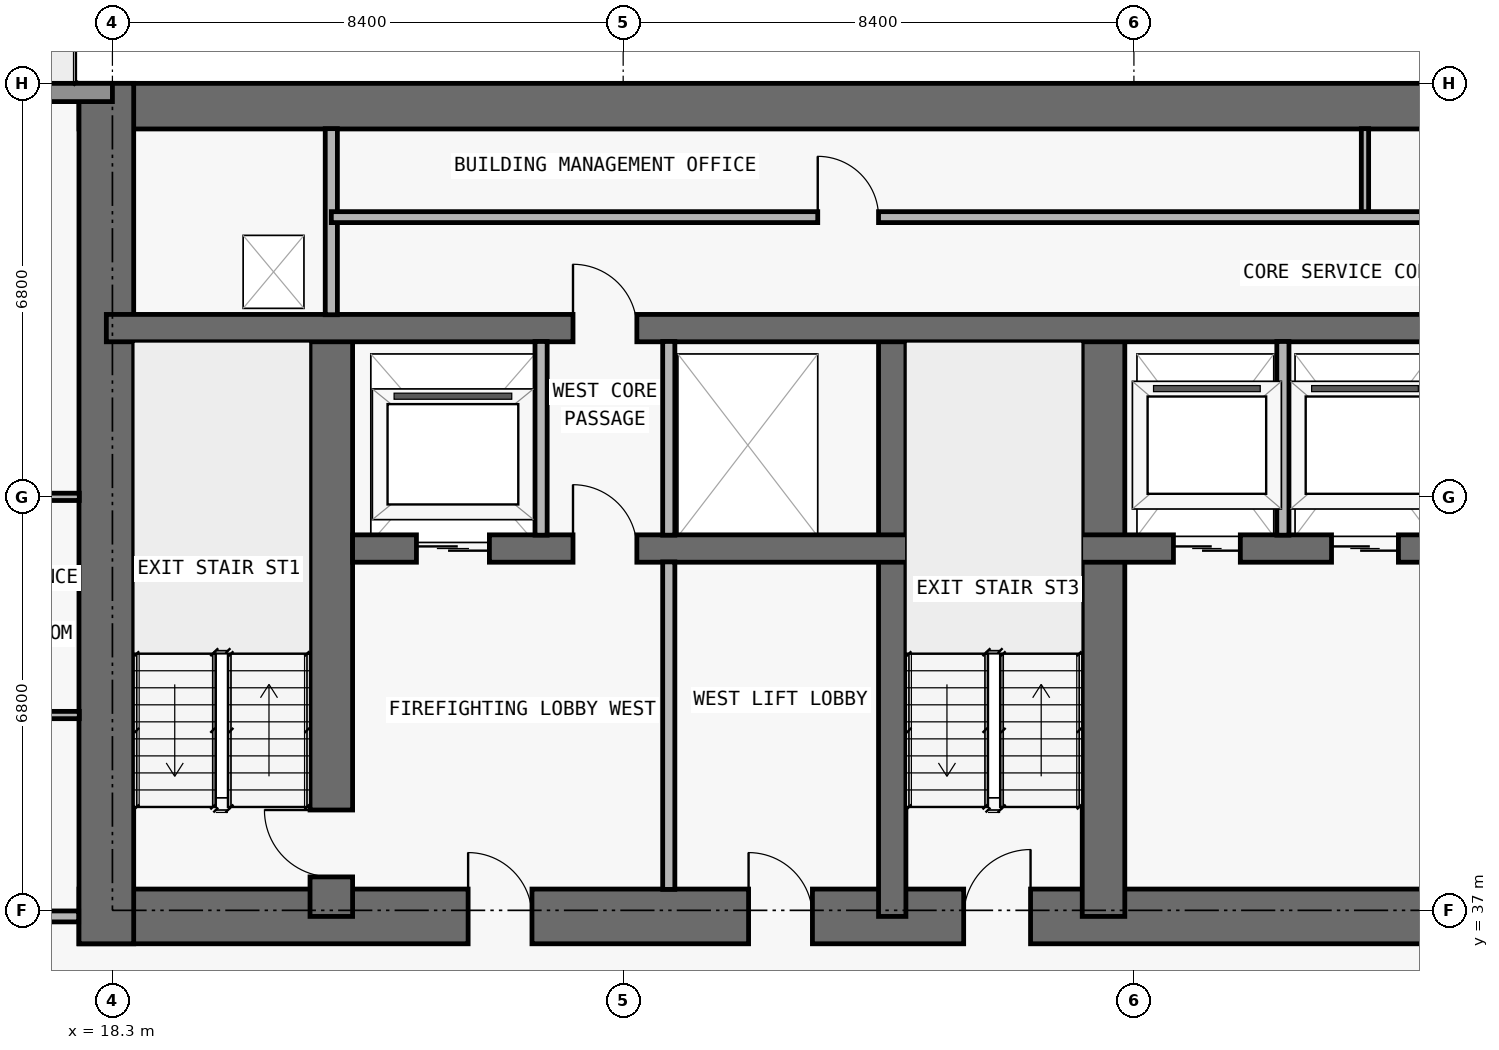
"""IFC4 building model, lengths in metres.
Left out: names, types, materials, properties, quantities, classifications, styles, units other than length and angle.
Written with IfcOpenShell. Run it as: python <this file> out.ifc"""

import sys

from ifc_helpers import new_model, si_unit, direction, frame, frame_2d, origin, place, context, subcontext, project, spatial, rectangle, extrude, element, fill, save


model = new_model("IFC4")
c1 = context("Model", 3, precision=1e-05, world=origin(), true_north=direction((0.0, 1.0)))
c2 = subcontext(c1, "Body", "Model", "MODEL_VIEW")
j1 = project(units=[si_unit("LENGTHUNIT", "METRE"), si_unit("PLANEANGLEUNIT", "RADIAN")], contexts=[c1])
p1 = place(None, origin())
s1 = spatial("IfcSite", under=j1, at=p1, CompositionType="ELEMENT")
p2 = place(p1, origin())
s2 = spatial("IfcBuilding", under=s1, at=p2, CompositionType="ELEMENT")
p3 = place(p2, frame((0.0, 0.0, 30.0)))
s3 = spatial("IfcBuildingStorey", under=s2, at=p3, CompositionType="ELEMENT", Elevation=30.0)
p4 = place(p3, frame((17.75, 36.9, 0.0), z_axis=(0.0, 0.0, 1.0), x_axis=(1.0, 0.0, 0.0)))
e1 = element("IfcWall", 1, at=p4, inside=s3, PredefinedType="SHEAR", context=c2, shape_type="SweptSolid", body=[
    extrude(rectangle(XDim=42.3, YDim=0.9, at=frame_2d((21.15, 0.0))), origin(), (0.0, 0.0, 1.0), 3.05),
])
p5 = place(p4, frame((14.55, 0.0, 0.0)))
e2 = element("IfcOpeningElement", 2, at=p5, cuts=e1, PredefinedType="OPENING", context=c2, shape_type="SweptSolid", body=[
    extrude(rectangle(XDim=1.1, YDim=2.15, at=frame_2d((0.55, 1.075))), frame((0.0, 0.46, 0.0), z_axis=(0.0, -1.0, 0.0), x_axis=(1.0, 0.0, 0.0)), (0.0, 0.0, 1.0), 0.92),
])
p6 = place(p4, frame((6.4, 0.0, 0.0)))
e3 = element("IfcOpeningElement", 3, at=p6, cuts=e1, PredefinedType="OPENING", context=c2, shape_type="SweptSolid", body=[
    extrude(rectangle(XDim=1.05, YDim=2.15, at=frame_2d((0.525, 1.075))), frame((0.0, 0.46, 0.0), z_axis=(0.0, -1.0, 0.0), x_axis=(1.0, 0.0, 0.0)), (0.0, 0.0, 1.0), 0.92),
])
p7 = place(p4, frame((34.9, 0.0, 0.0)))
e4 = element("IfcOpeningElement", 4, at=p7, cuts=e1, PredefinedType="OPENING", context=c2, shape_type="SweptSolid", body=[
    extrude(rectangle(XDim=1.05, YDim=2.15, at=frame_2d((0.525, 1.075))), frame((0.0, 0.46, 0.0), z_axis=(0.0, -1.0, 0.0), x_axis=(1.0, 0.0, 0.0)), (0.0, 0.0, 1.0), 0.92),
])
p8 = place(p4, frame((11.012, 0.0, 0.0)))
e5 = element("IfcOpeningElement", 5, at=p8, cuts=e1, PredefinedType="OPENING", context=c2, shape_type="SweptSolid", body=[
    extrude(rectangle(XDim=1.05, YDim=2.15, at=frame_2d((0.525, 1.075))), frame((0.0, 0.46, 0.0), z_axis=(0.0, -1.0, 0.0), x_axis=(1.0, 0.0, 0.0)), (0.0, 0.0, 1.0), 0.92),
])
p9 = place(p4, frame((24.25, 0.0, 0.0)))
e6 = element("IfcOpeningElement", 6, at=p9, cuts=e1, PredefinedType="OPENING", context=c2, shape_type="SweptSolid", body=[
    extrude(rectangle(XDim=1.05, YDim=2.15, at=frame_2d((0.525, 1.075))), frame((0.0, 0.46, 0.0), z_axis=(0.0, -1.0, 0.0), x_axis=(1.0, 0.0, 0.0)), (0.0, 0.0, 1.0), 0.92),
])
p10 = place(p3, frame((17.75, 50.225, 0.0), z_axis=(0.0, 0.0, 1.0), x_axis=(1.0, 0.0, 0.0)))
e7 = element("IfcWall", 7, at=p10, inside=s3, PredefinedType="SHEAR", context=c2, shape_type="SweptSolid", body=[
    extrude(rectangle(XDim=42.3, YDim=0.75, at=frame_2d((21.15, 0.0))), origin(), (0.0, 0.0, 1.0), 3.05),
])
p11 = place(p3, frame((18.2, 36.45, 0.0), z_axis=(0.0, 0.0, 1.0), x_axis=(0.0, 1.0, 0.0)))
e8 = element("IfcWall", 8, at=p11, inside=s3, PredefinedType="SHEAR", context=c2, shape_type="SweptSolid", body=[
    extrude(rectangle(XDim=14.15, YDim=0.9, at=frame_2d((7.075, 0.0))), origin(), (0.0, 0.0, 1.0), 3.05),
])
p12 = place(p3, frame((21.9, 36.9, 0.0), z_axis=(0.0, 0.0, 1.0), x_axis=(0.0, 1.0, 0.0)))
e9 = element("IfcWall", 9, at=p12, inside=s3, PredefinedType="SHEAR", context=c2, shape_type="SweptSolid", body=[
    extrude(rectangle(XDim=9.675, YDim=0.7, at=frame_2d((4.837, 0.0))), origin(), (0.0, 0.0, 1.0), 3.05),
])
p13 = place(p12, frame((0.65, 0.0, 0.0)))
e10 = element("IfcOpeningElement", 10, at=p13, cuts=e9, PredefinedType="OPENING", context=c2, shape_type="SweptSolid", body=[
    extrude(rectangle(XDim=1.1, YDim=2.15, at=frame_2d((0.55, 1.075))), frame((0.0, 0.36, 0.0), z_axis=(0.0, -1.0, 0.0), x_axis=(1.0, 0.0, 0.0)), (0.0, 0.0, 1.0), 0.72),
])
p14 = place(p3, frame((31.125, 36.9, 0.0), z_axis=(0.0, 0.0, 1.0), x_axis=(0.0, 1.0, 0.0)))
e11 = element("IfcWall", 11, at=p14, inside=s3, PredefinedType="SHEAR", context=c2, shape_type="SweptSolid", body=[
    extrude(rectangle(XDim=9.675, YDim=0.45, at=frame_2d((4.837, 0.0))), origin(), (0.0, 0.0, 1.0), 3.05),
])
p15 = place(p3, frame((34.6, 36.9, 0.0), z_axis=(0.0, 0.0, 1.0), x_axis=(0.0, 1.0, 0.0)))
e12 = element("IfcWall", 12, at=p15, inside=s3, PredefinedType="SHEAR", context=c2, shape_type="SweptSolid", body=[
    extrude(rectangle(XDim=9.675, YDim=0.7, at=frame_2d((4.837, 0.0))), origin(), (0.0, 0.0, 1.0), 3.05),
])
p16 = place(p3, frame((22.25, 42.95, 0.0), z_axis=(0.0, 0.0, 1.0), x_axis=(1.0, 0.0, 0.0)))
e13 = element("IfcWall", 13, at=p16, inside=s3, PredefinedType="SHEAR", context=c2, shape_type="SweptSolid", body=[
    extrude(rectangle(XDim=33.3, YDim=0.45, at=frame_2d((16.65, 0.0))), origin(), (0.0, 0.0, 1.0), 3.05),
])
p17 = place(p16, frame((1.05, 0.0, 0.0)))
e14 = element("IfcOpeningElement", 14, at=p17, cuts=e13, PredefinedType="OPENING", context=c2, shape_type="SweptSolid", body=[
    extrude(rectangle(XDim=1.2, YDim=2.2, at=frame_2d((0.6, 1.1))), frame((0.0, 0.235, 0.0), z_axis=(0.0, -1.0, 0.0), x_axis=(1.0, 0.0, 0.0)), (0.0, 0.0, 1.0), 0.47),
])
p18 = place(p16, frame((31.05, 0.0, 0.0)))
e15 = element("IfcOpeningElement", 15, at=p18, cuts=e13, PredefinedType="OPENING", context=c2, shape_type="SweptSolid", body=[
    extrude(rectangle(XDim=1.2, YDim=2.2, at=frame_2d((0.6, 1.1))), frame((0.0, 0.235, 0.0), z_axis=(0.0, -1.0, 0.0), x_axis=(1.0, 0.0, 0.0)), (0.0, 0.0, 1.0), 0.47),
])
p19 = place(p16, frame((13.5, 0.0, 0.0)))
e16 = element("IfcOpeningElement", 16, at=p19, cuts=e13, PredefinedType="OPENING", context=c2, shape_type="SweptSolid", body=[
    extrude(rectangle(XDim=1.1, YDim=2.2, at=frame_2d((0.55, 1.1))), frame((0.0, 0.235, 0.0), z_axis=(0.0, -1.0, 0.0), x_axis=(1.0, 0.0, 0.0)), (0.0, 0.0, 1.0), 0.47),
])
p20 = place(p16, frame((16.1, 0.0, 0.0)))
e17 = element("IfcOpeningElement", 17, at=p20, cuts=e13, PredefinedType="OPENING", context=c2, shape_type="SweptSolid", body=[
    extrude(rectangle(XDim=1.1, YDim=2.2, at=frame_2d((0.55, 1.1))), frame((0.0, 0.235, 0.0), z_axis=(0.0, -1.0, 0.0), x_axis=(1.0, 0.0, 0.0)), (0.0, 0.0, 1.0), 0.47),
])
p21 = place(p16, frame((18.7, 0.0, 0.0)))
e18 = element("IfcOpeningElement", 18, at=p21, cuts=e13, PredefinedType="OPENING", context=c2, shape_type="SweptSolid", body=[
    extrude(rectangle(XDim=1.1, YDim=2.2, at=frame_2d((0.55, 1.1))), frame((0.0, 0.235, 0.0), z_axis=(0.0, -1.0, 0.0), x_axis=(1.0, 0.0, 0.0)), (0.0, 0.0, 1.0), 0.47),
])
p22 = place(p16, frame((3.625, 0.0, 0.0)))
e19 = element("IfcOpeningElement", 19, at=p22, cuts=e13, PredefinedType="OPENING", context=c2, shape_type="SweptSolid", body=[
    extrude(rectangle(XDim=1.05, YDim=2.15, at=frame_2d((0.525, 1.075))), frame((0.0, 0.235, 0.0), z_axis=(0.0, -1.0, 0.0), x_axis=(1.0, 0.0, 0.0)), (0.0, 0.0, 1.0), 0.47),
])
p23 = place(p16, frame((28.675, 0.0, 0.0)))
e20 = element("IfcOpeningElement", 20, at=p23, cuts=e13, PredefinedType="OPENING", context=c2, shape_type="SweptSolid", body=[
    extrude(rectangle(XDim=1.05, YDim=2.15, at=frame_2d((0.525, 1.075))), frame((0.0, 0.235, 0.0), z_axis=(0.0, -1.0, 0.0), x_axis=(1.0, 0.0, 0.0)), (0.0, 0.0, 1.0), 0.47),
])
p24 = place(p3, frame((18.2, 46.575, 0.0), z_axis=(0.0, 0.0, 1.0), x_axis=(1.0, 0.0, 0.0)))
e21 = element("IfcWall", 21, at=p24, inside=s3, PredefinedType="SHEAR", context=c2, shape_type="SweptSolid", body=[
    extrude(rectangle(XDim=41.4, YDim=0.45, at=frame_2d((20.7, 0.0))), origin(), (0.0, 0.0, 1.0), 3.05),
])
p25 = place(p24, frame((7.675, 0.0, 0.0)))
e22 = element("IfcOpeningElement", 22, at=p25, cuts=e21, PredefinedType="OPENING", context=c2, shape_type="SweptSolid", body=[
    extrude(rectangle(XDim=1.05, YDim=2.15, at=frame_2d((0.525, 1.075))), frame((0.0, 0.235, 0.0), z_axis=(0.0, -1.0, 0.0), x_axis=(1.0, 0.0, 0.0)), (0.0, 0.0, 1.0), 0.47),
])
p26 = place(p24, frame((32.725, 0.0, 0.0)))
e23 = element("IfcOpeningElement", 23, at=p26, cuts=e21, PredefinedType="OPENING", context=c2, shape_type="SweptSolid", body=[
    extrude(rectangle(XDim=1.05, YDim=2.15, at=frame_2d((0.525, 1.075))), frame((0.0, 0.235, 0.0), z_axis=(0.0, -1.0, 0.0), x_axis=(1.0, 0.0, 0.0)), (0.0, 0.0, 1.0), 0.47),
])
p27 = place(p3, frame((5.1, 50.45, 0.0), z_axis=(0.0, 0.0, 1.0), x_axis=(1.0, 0.0, 0.0)))
e24 = element("IfcWall", 24, at=p27, inside=s3, PredefinedType="STANDARD", context=c2, shape_type="SweptSolid", body=[
    extrude(rectangle(XDim=13.2, YDim=0.3, at=frame_2d((6.6, 0.0))), origin(), (0.0, 0.0, 1.0), 3.05),
])
p28 = place(p27, frame((5.6, 0.0, 0.0)))
e25 = element("IfcOpeningElement", 25, at=p28, cuts=e24, PredefinedType="OPENING", context=c2, shape_type="SweptSolid", body=[
    extrude(rectangle(XDim=2.0, YDim=2.3, at=frame_2d((1.0, 1.15))), frame((0.0, 0.16, 0.0), z_axis=(0.0, -1.0, 0.0), x_axis=(1.0, 0.0, 0.0)), (0.0, 0.0, 1.0), 0.32),
])
p29 = place(p3, frame((21.9, 46.795, 0.0), z_axis=(0.0, 0.0, 1.0), x_axis=(0.0, 1.0, 0.0)))
e26 = element("IfcWall", 26, at=p29, inside=s3, PredefinedType="PARTITIONING", context=c2, shape_type="SweptSolid", body=[
    extrude(rectangle(XDim=3.06, YDim=0.2, at=frame_2d((1.53, 0.0))), origin(), (0.0, 0.0, 1.0), 3.05),
])
p30 = place(p3, frame((25.35, 43.17, 0.0), z_axis=(0.0, 0.0, 1.0), x_axis=(0.0, 1.0, 0.0)))
e27 = element("IfcWall", 27, at=p30, inside=s3, PredefinedType="PARTITIONING", context=c2, shape_type="SweptSolid", body=[
    extrude(rectangle(XDim=3.185, YDim=0.2, at=frame_2d((1.593, 0.0))), origin(), (0.0, 0.0, 1.0), 3.05),
])
p31 = place(p3, frame((27.45, 37.345, 0.0), z_axis=(0.0, 0.0, 1.0), x_axis=(0.0, 1.0, 0.0)))
e28 = element("IfcWall", 28, at=p31, inside=s3, PredefinedType="PARTITIONING", context=c2, shape_type="SweptSolid", body=[
    extrude(rectangle(XDim=5.385, YDim=0.2, at=frame_2d((2.692, 0.0))), origin(), (0.0, 0.0, 1.0), 3.05),
])
for number, where, z_axis, x_axis in (
    (29, (27.45, 43.17, 0.0), (0.0, 0.0, 1.0), (0.0, 1.0, 0.0)),
    (30, (37.55, 43.17, 0.0), (0.0, 0.0, 1.0), (0.0, 1.0, 0.0)),
):
    element("IfcWall", number, at=place(p3, frame(where, z_axis=z_axis, x_axis=x_axis)), inside=s3, PredefinedType="PARTITIONING", context=c2, shape_type="SweptSolid", body=[
        extrude(rectangle(XDim=3.185, YDim=0.2, at=frame_2d((1.593, 0.0))), origin(), (0.0, 0.0, 1.0), 3.05),
    ])
p32 = place(p3, frame((38.9, 48.4, 0.0), z_axis=(0.0, 0.0, 1.0), x_axis=(0.0, 1.0, 0.0)))
e31 = element("IfcWall", 31, at=p32, inside=s3, PredefinedType="PARTITIONING", context=c2, shape_type="SweptSolid", body=[
    extrude(rectangle(XDim=1.455, YDim=0.12, at=frame_2d((0.728, 0.0))), origin(), (0.0, 0.0, 1.0), 3.05),
])
p33 = place(p3, frame((5.1, 36.9, 0.0), z_axis=(0.0, 0.0, 1.0), x_axis=(1.0, 0.0, 0.0)))
e32 = element("IfcWall", 32, at=p33, inside=s3, PredefinedType="PARTITIONING", context=c2, shape_type="SweptSolid", body=[
    extrude(rectangle(XDim=12.645, YDim=0.18, at=frame_2d((6.323, 0.0))), origin(), (0.0, 0.0, 1.0), 3.05),
])
p34 = place(p33, frame((7.125, 0.0, 0.0)))
e33 = element("IfcOpeningElement", 33, at=p34, cuts=e32, PredefinedType="OPENING", context=c2, shape_type="SweptSolid", body=[
    extrude(rectangle(XDim=1.0, YDim=2.2, at=frame_2d((0.5, 1.1))), frame((0.0, 0.1, 0.0), z_axis=(0.0, -1.0, 0.0), x_axis=(1.0, 0.0, 0.0)), (0.0, 0.0, 1.0), 0.2),
])
p35 = place(p3, frame((15.55, 40.212, 0.0), z_axis=(0.0, 0.0, 1.0), x_axis=(1.0, 0.0, 0.0)))
e34 = element("IfcWall", 34, at=p35, inside=s3, PredefinedType="PARTITIONING", context=c2, shape_type="SweptSolid", body=[
    extrude(rectangle(XDim=2.205, YDim=0.12, at=frame_2d((1.103, 0.0))), origin(), (0.0, 0.0, 1.0), 3.05),
])
p36 = place(p3, frame((1.795, 43.8, 0.0), z_axis=(0.0, 0.0, 1.0), x_axis=(1.0, 0.0, 0.0)))
e35 = element("IfcWall", 35, at=p36, inside=s3, PredefinedType="PARTITIONING", context=c2, shape_type="SweptSolid", body=[
    extrude(rectangle(XDim=15.96, YDim=0.12, at=frame_2d((7.98, 0.0))), origin(), (0.0, 0.0, 1.0), 2.339),
])
p37 = place(p36, frame((5.255, 0.0, 0.0)))
e36 = element("IfcOpeningElement", 36, at=p37, cuts=e35, PredefinedType="OPENING", context=c2, shape_type="SweptSolid", body=[
    extrude(rectangle(XDim=0.9, YDim=2.15, at=frame_2d((0.45, 1.075))), frame((0.0, 0.07, 0.0), z_axis=(0.0, -1.0, 0.0), x_axis=(1.0, 0.0, 0.0)), (0.0, 0.0, 1.0), 0.14),
])
p38 = place(p36, frame((10.48, 0.0, 0.0)))
e37 = element("IfcOpeningElement", 37, at=p38, cuts=e35, PredefinedType="OPENING", context=c2, shape_type="SweptSolid", body=[
    extrude(rectangle(XDim=0.9, YDim=2.15, at=frame_2d((0.45, 1.075))), frame((0.0, 0.07, 0.0), z_axis=(0.0, -1.0, 0.0), x_axis=(1.0, 0.0, 0.0)), (0.0, 0.0, 1.0), 0.14),
])
p39 = place(p36, frame((14.433, 0.0, 0.0)))
e38 = element("IfcOpeningElement", 38, at=p39, cuts=e35, PredefinedType="OPENING", context=c2, shape_type="SweptSolid", body=[
    extrude(rectangle(XDim=0.85, YDim=2.1, at=frame_2d((0.425, 1.05))), frame((0.0, 0.07, 0.0), z_axis=(0.0, -1.0, 0.0), x_axis=(1.0, 0.0, 0.0)), (0.0, 0.0, 1.0), 0.14),
])
p40 = place(p3, frame((21.9, 48.4, 0.0), z_axis=(0.0, 0.0, 1.0), x_axis=(1.0, 0.0, 0.0)))
e39 = element("IfcWall", 39, at=p40, inside=s3, PredefinedType="PARTITIONING", context=c2, shape_type="SweptSolid", body=[
    extrude(rectangle(XDim=33.986, YDim=0.18, at=frame_2d((16.993, 0.0))), origin(), (0.0, 0.0, 1.0), 3.05),
])
p41 = place(p40, frame((8.0, 0.0, 0.0)))
e40 = element("IfcOpeningElement", 40, at=p41, cuts=e39, PredefinedType="OPENING", context=c2, shape_type="SweptSolid", body=[
    extrude(rectangle(XDim=1.0, YDim=2.2, at=frame_2d((0.5, 1.1))), frame((0.0, 0.1, 0.0), z_axis=(0.0, -1.0, 0.0), x_axis=(1.0, 0.0, 0.0)), (0.0, 0.0, 1.0), 0.2),
])
p42 = place(p40, frame((24.993, 0.0, 0.0)))
e41 = element("IfcOpeningElement", 41, at=p42, cuts=e39, PredefinedType="OPENING", context=c2, shape_type="SweptSolid", body=[
    extrude(rectangle(XDim=1.0, YDim=2.2, at=frame_2d((0.5, 1.1))), frame((0.0, 0.1, 0.0), z_axis=(0.0, -1.0, 0.0), x_axis=(1.0, 0.0, 0.0)), (0.0, 0.0, 1.0), 0.2),
])
p43 = place(p17, origin())
e42 = element("IfcDoor", 42, at=p43, inside=s3, OperationType="DOUBLE_DOOR_SLIDING", PredefinedType="DOOR", context=c2, shape_type="SweptSolid", body=[
    extrude(rectangle(XDim=1.2, YDim=2.2, at=frame_2d((0.6, 1.1))), frame((0.0, 0.025, 0.0), z_axis=(0.0, -1.0, 0.0), x_axis=(1.0, 0.0, 0.0)), (0.0, 0.0, 1.0), 0.05),
])
fill(e14, e42)
p44 = place(p19, origin())
e43 = element("IfcDoor", 43, at=p44, inside=s3, OperationType="DOUBLE_DOOR_SLIDING", PredefinedType="DOOR", context=c2, shape_type="SweptSolid", body=[
    extrude(rectangle(XDim=1.1, YDim=2.2, at=frame_2d((0.55, 1.1))), frame((0.0, 0.025, 0.0), z_axis=(0.0, -1.0, 0.0), x_axis=(1.0, 0.0, 0.0)), (0.0, 0.0, 1.0), 0.05),
])
fill(e16, e43)
p45 = place(p20, origin())
e44 = element("IfcDoor", 44, at=p45, inside=s3, OperationType="DOUBLE_DOOR_SLIDING", PredefinedType="DOOR", context=c2, shape_type="SweptSolid", body=[
    extrude(rectangle(XDim=1.1, YDim=2.2, at=frame_2d((0.55, 1.1))), frame((0.0, 0.025, 0.0), z_axis=(0.0, -1.0, 0.0), x_axis=(1.0, 0.0, 0.0)), (0.0, 0.0, 1.0), 0.05),
])
fill(e17, e44)
p46 = place(p5, origin())
e45 = element("IfcDoor", 45, at=p46, inside=s3, OperationType="SINGLE_SWING_RIGHT", PredefinedType="DOOR", context=c2, shape_type="SweptSolid", body=[
    extrude(rectangle(XDim=1.1, YDim=2.15, at=frame_2d((0.55, 1.075))), frame((0.0, 0.025, 0.0), z_axis=(0.0, -1.0, 0.0), x_axis=(1.0, 0.0, 0.0)), (0.0, 0.0, 1.0), 0.05),
])
fill(e2, e45)
p47 = place(p6, origin())
e46 = element("IfcDoor", 46, at=p47, inside=s3, OperationType="SINGLE_SWING_LEFT", PredefinedType="DOOR", context=c2, shape_type="SweptSolid", body=[
    extrude(rectangle(XDim=1.05, YDim=2.15, at=frame_2d((0.525, 1.075))), frame((0.0, 0.025, 0.0), z_axis=(0.0, -1.0, 0.0), x_axis=(1.0, 0.0, 0.0)), (0.0, 0.0, 1.0), 0.05),
])
fill(e3, e46)
p48 = place(p13, origin())
e47 = element("IfcDoor", 47, at=p48, inside=s3, OperationType="SINGLE_SWING_RIGHT", PredefinedType="DOOR", context=c2, shape_type="SweptSolid", body=[
    extrude(rectangle(XDim=1.1, YDim=2.15, at=frame_2d((0.55, 1.075))), frame((0.0, 0.025, 0.0), z_axis=(0.0, -1.0, 0.0), x_axis=(1.0, 0.0, 0.0)), (0.0, 0.0, 1.0), 0.05),
])
fill(e10, e47)
p49 = place(p22, origin())
e48 = element("IfcDoor", 48, at=p49, inside=s3, OperationType="SINGLE_SWING_LEFT", PredefinedType="DOOR", context=c2, shape_type="SweptSolid", body=[
    extrude(rectangle(XDim=1.05, YDim=2.15, at=frame_2d((0.525, 1.075))), frame((0.0, 0.025, 0.0), z_axis=(0.0, -1.0, 0.0), x_axis=(1.0, 0.0, 0.0)), (0.0, 0.0, 1.0), 0.05),
])
fill(e19, e48)
p50 = place(p8, origin())
e49 = element("IfcDoor", 49, at=p50, inside=s3, OperationType="SINGLE_SWING_LEFT", PredefinedType="DOOR", context=c2, shape_type="SweptSolid", body=[
    extrude(rectangle(XDim=1.05, YDim=2.15, at=frame_2d((0.525, 1.075))), frame((0.0, 0.025, 0.0), z_axis=(0.0, -1.0, 0.0), x_axis=(1.0, 0.0, 0.0)), (0.0, 0.0, 1.0), 0.05),
])
fill(e5, e49)
p51 = place(p25, origin())
e50 = element("IfcDoor", 50, at=p51, inside=s3, OperationType="SINGLE_SWING_LEFT", PredefinedType="DOOR", context=c2, shape_type="SweptSolid", body=[
    extrude(rectangle(XDim=1.05, YDim=2.15, at=frame_2d((0.525, 1.075))), frame((0.0, 0.025, 0.0), z_axis=(0.0, -1.0, 0.0), x_axis=(1.0, 0.0, 0.0)), (0.0, 0.0, 1.0), 0.05),
])
fill(e22, e50)
p52 = place(p41, origin())
e51 = element("IfcDoor", 51, at=p52, inside=s3, OperationType="SINGLE_SWING_LEFT", PredefinedType="DOOR", context=c2, shape_type="SweptSolid", body=[
    extrude(rectangle(XDim=1.0, YDim=2.2, at=frame_2d((0.5, 1.1))), frame((0.0, 0.025, 0.0), z_axis=(0.0, -1.0, 0.0), x_axis=(1.0, 0.0, 0.0)), (0.0, 0.0, 1.0), 0.05),
])
fill(e40, e51)
save(model, sys.argv[1])
